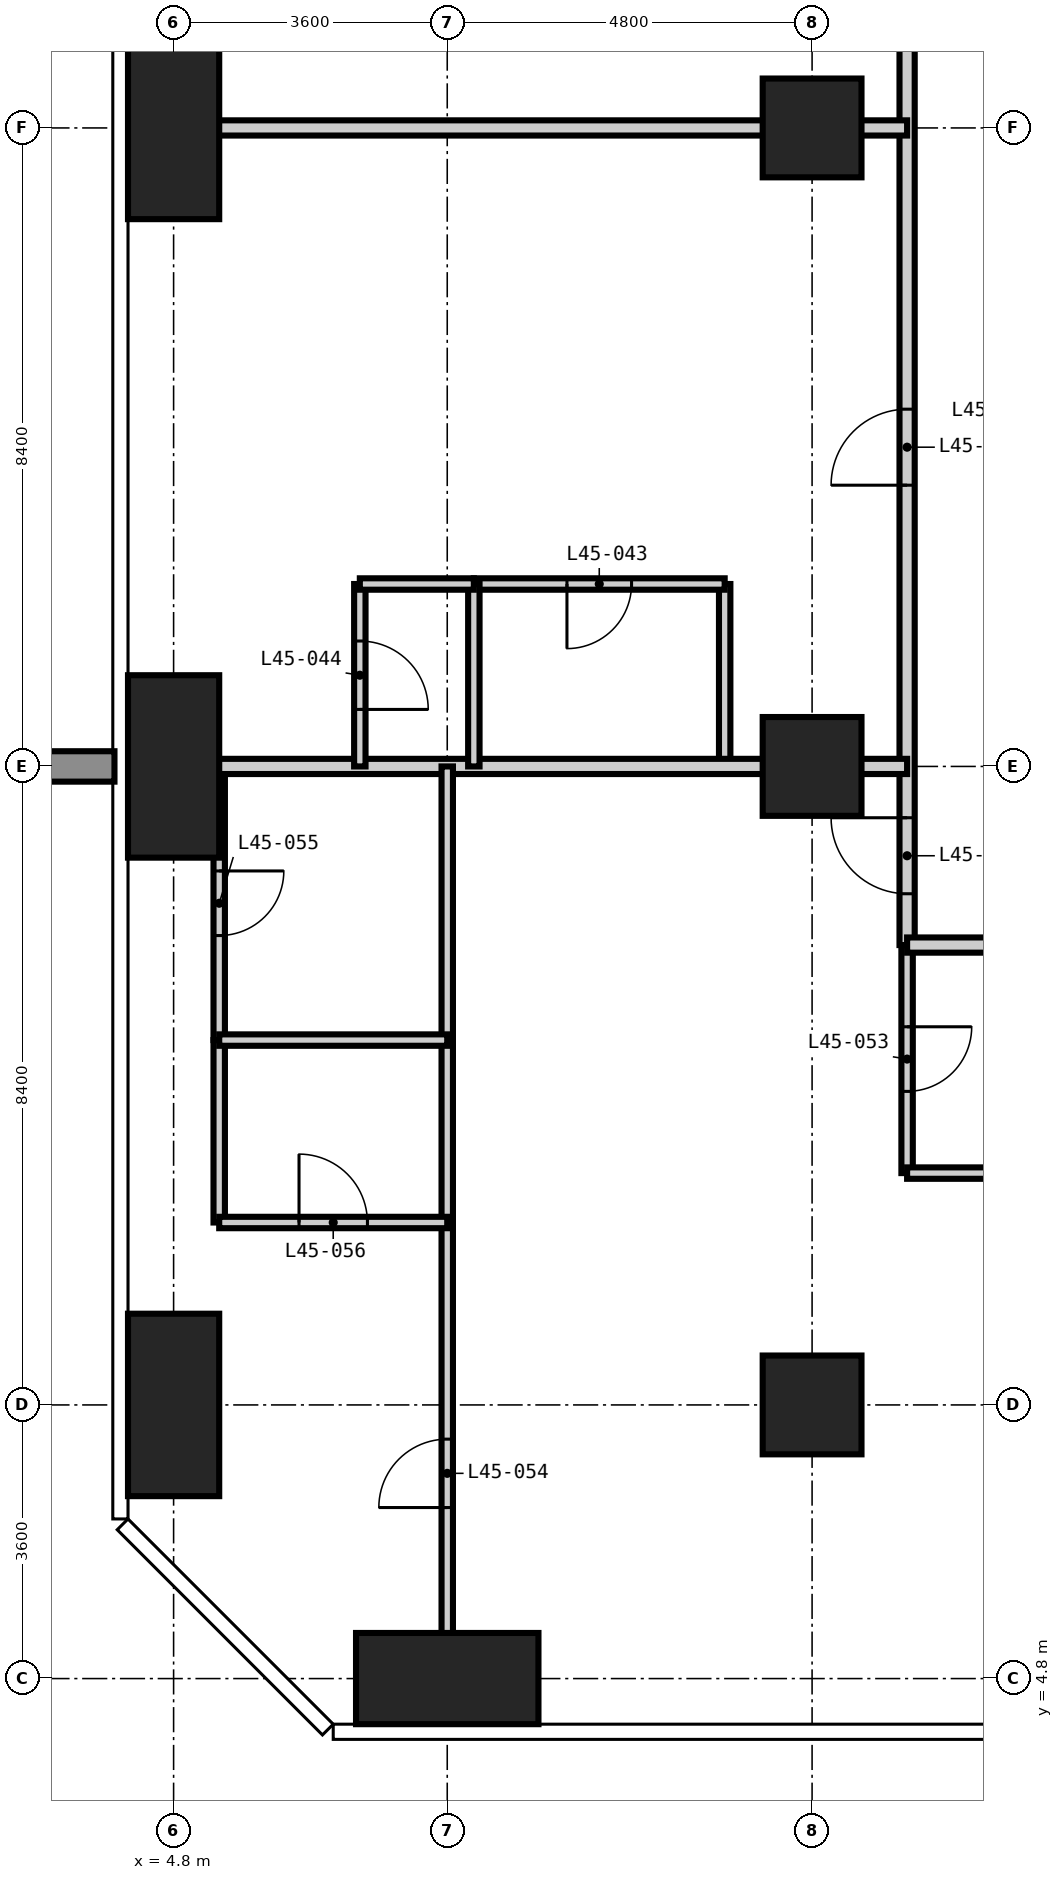
"""IFC4 building model, lengths in metres.
Left out: names, types, materials, properties, quantities, classifications, styles, units other than length and angle.
Written with IfcOpenShell. Run it as: python <this file> out.ifc"""

import sys

from ifc_helpers import new_model, si_unit, direction, frame, frame_2d, origin, origin_2d, place, context, subcontext, project, spatial, rectangle, extrude, element, fill, save


model = new_model("IFC4")
c1 = context("Model", 3, precision=1e-05, world=origin(), true_north=direction((0.0, 1.0)))
c2 = subcontext(c1, "Body", "Model", "MODEL_VIEW")
j1 = project(units=[si_unit("LENGTHUNIT", "METRE"), si_unit("PLANEANGLEUNIT", "RADIAN")], contexts=[c1])
p1 = place(None, origin())
s1 = spatial("IfcSite", under=j1, at=p1, CompositionType="ELEMENT")
p2 = place(p1, origin())
s2 = spatial("IfcBuilding", under=s1, at=p2, CompositionType="ELEMENT")
p3 = place(p2, frame((0.0, 0.0, 177.0)))
s3 = spatial("IfcBuildingStorey", under=s2, at=p3, CompositionType="ELEMENT", Elevation=177.0)
for number, where, z_axis, x_axis in (
    (1, (4.8, 8.4, -0.35), (0.0, 0.0, 1.0), (1.0, 0.0, 0.0)),
    (2, (4.8, 16.8, -0.35), (0.0, 0.0, 1.0), (1.0, 0.0, 0.0)),
    (3, (4.8, 25.2, -0.35), (0.0, 0.0, 1.0), (1.0, 0.0, 0.0)),
):
    element("IfcColumn", number, at=place(p3, frame(where, z_axis=z_axis, x_axis=x_axis)), inside=s3, PredefinedType="COLUMN", context=c2, shape_type="SweptSolid", body=[
        extrude(rectangle(XDim=1.2, YDim=2.4, at=origin_2d()), origin(), (0.0, 0.0, 1.0), 3.6),
    ])
p4 = place(p3, frame((8.4, 4.8, -0.35), z_axis=(0.0, 0.0, 1.0), x_axis=(1.0, 0.0, 0.0)))
e4 = element("IfcColumn", 4, at=p4, inside=s3, PredefinedType="COLUMN", context=c2, shape_type="SweptSolid", body=[
    extrude(rectangle(XDim=2.4, YDim=1.2, at=origin_2d()), origin(), (0.0, 0.0, 1.0), 3.6),
])
for number, where, z_axis, x_axis in (
    (5, (13.2, 8.4, -0.35), (0.0, 0.0, 1.0), (1.0, 0.0, 0.0)),
    (6, (13.2, 16.8, -0.35), (0.0, 0.0, 1.0), (1.0, 0.0, 0.0)),
    (7, (13.2, 25.2, -0.35), (0.0, 0.0, 1.0), (1.0, 0.0, 0.0)),
):
    element("IfcColumn", number, at=place(p3, frame(where, z_axis=z_axis, x_axis=x_axis)), inside=s3, PredefinedType="COLUMN", context=c2, shape_type="SweptSolid", body=[
        extrude(rectangle(XDim=1.3, YDim=1.3, at=origin_2d()), origin(), (0.0, 0.0, 1.0), 3.6),
    ])
p5 = place(p3, frame((5.4, 13.2, 0.0), z_axis=(0.0, 0.0, 1.0), x_axis=(0.0, 1.0, 0.0)))
e8 = element("IfcWall", 8, at=p5, inside=s3, PredefinedType="PARTITIONING", context=c2, shape_type="SweptSolid", body=[
    extrude(rectangle(XDim=3.6, YDim=0.15, at=frame_2d((1.8, 0.0))), origin(), (0.0, 0.0, 1.0), 3.25),
])
p6 = place(p5, frame((1.375, 0.0, 0.0)))
e9 = element("IfcOpeningElement", 9, at=p6, cuts=e8, PredefinedType="OPENING", context=c2, shape_type="SweptSolid", body=[
    extrude(rectangle(XDim=0.85, YDim=2.1, at=frame_2d((0.425, 1.05))), frame((0.0, 0.085, 0.0), z_axis=(0.0, -1.0, 0.0), x_axis=(1.0, 0.0, 0.0)), (0.0, 0.0, 1.0), 0.17),
])
p7 = place(p3, frame((12.05, 16.8, 0.0), z_axis=(0.0, 0.0, 1.0), x_axis=(0.0, 1.0, 0.0)))
e10 = element("IfcWall", 10, at=p7, inside=s3, PredefinedType="PARTITIONING", context=c2, shape_type="SweptSolid", body=[
    extrude(rectangle(XDim=2.4, YDim=0.15, at=frame_2d((1.2, 0.0))), origin(), (0.0, 0.0, 1.0), 3.25),
])
p8 = place(p3, frame((14.45, 11.45, 0.0), z_axis=(0.0, 0.0, 1.0), x_axis=(0.0, 1.0, 0.0)))
e11 = element("IfcWall", 11, at=p8, inside=s3, PredefinedType="PARTITIONING", context=c2, shape_type="SweptSolid", body=[
    extrude(rectangle(XDim=3.0, YDim=0.15, at=frame_2d((1.5, 0.0))), origin(), (0.0, 0.0, 1.0), 3.25),
])
p9 = place(p8, frame((1.075, 0.0, 0.0)))
e12 = element("IfcOpeningElement", 12, at=p9, cuts=e11, PredefinedType="OPENING", context=c2, shape_type="SweptSolid", body=[
    extrude(rectangle(XDim=0.85, YDim=2.1, at=frame_2d((0.425, 1.05))), frame((0.0, 0.085, 0.0), z_axis=(0.0, -1.0, 0.0), x_axis=(1.0, 0.0, 0.0)), (0.0, 0.0, 1.0), 0.17),
])
p10 = place(p3, frame((14.45, 11.45, 0.0), z_axis=(0.0, 0.0, 1.0), x_axis=(1.0, 0.0, 0.0)))
e13 = element("IfcWall", 13, at=p10, inside=s3, PredefinedType="PARTITIONING", context=c2, shape_type="SweptSolid", body=[
    extrude(rectangle(XDim=2.35, YDim=0.15, at=frame_2d((1.175, 0.0))), origin(), (0.0, 0.0, 1.0), 3.25),
])
p11 = place(p3, frame((8.75, 19.2, 0.0), z_axis=(0.0, 0.0, 1.0), x_axis=(1.0, 0.0, 0.0)))
e14 = element("IfcWall", 14, at=p11, inside=s3, PredefinedType="PARTITIONING", context=c2, shape_type="SweptSolid", body=[
    extrude(rectangle(XDim=3.3, YDim=0.15, at=frame_2d((1.65, 0.0))), origin(), (0.0, 0.0, 1.0), 3.25),
])
p12 = place(p11, frame((1.225, 0.0, 0.0)))
e15 = element("IfcOpeningElement", 15, at=p12, cuts=e14, PredefinedType="OPENING", context=c2, shape_type="SweptSolid", body=[
    extrude(rectangle(XDim=0.85, YDim=2.1, at=frame_2d((0.425, 1.05))), frame((0.0, 0.085, 0.0), z_axis=(0.0, -1.0, 0.0), x_axis=(1.0, 0.0, 0.0)), (0.0, 0.0, 1.0), 0.17),
])
p13 = place(p3, frame((14.45, 14.45, 0.0), z_axis=(0.0, 0.0, 1.0), x_axis=(0.0, 1.0, 0.0)))
e16 = element("IfcWall", 16, at=p13, inside=s3, PredefinedType="PARTITIONING", context=c2, shape_type="SweptSolid", body=[
    extrude(rectangle(XDim=31.1, YDim=0.2, at=frame_2d((15.55, 0.0))), origin(), (0.0, 0.0, 1.0), 3.25),
])
p14 = place(p13, frame((6.05, 0.0, 0.0)))
e17 = element("IfcOpeningElement", 17, at=p14, cuts=e16, PredefinedType="OPENING", context=c2, shape_type="SweptSolid", body=[
    extrude(rectangle(XDim=1.0, YDim=2.2, at=frame_2d((0.5, 1.1))), frame((0.0, 0.11, 0.0), z_axis=(0.0, -1.0, 0.0), x_axis=(1.0, 0.0, 0.0)), (0.0, 0.0, 1.0), 0.22),
])
p15 = place(p13, frame((11.95, 0.0, 0.0)))
e18 = element("IfcOpeningElement", 18, at=p15, cuts=e16, PredefinedType="OPENING", context=c2, shape_type="SweptSolid", body=[
    extrude(rectangle(XDim=1.8, YDim=2.4, at=frame_2d((0.9, 1.2))), frame((0.0, 0.11, 0.0), z_axis=(0.0, -1.0, 0.0), x_axis=(1.0, 0.0, 0.0)), (0.0, 0.0, 1.0), 0.22),
])
p16 = place(p13, frame((19.575, 0.0, 0.0)))
e19 = element("IfcOpeningElement", 19, at=p16, cuts=e16, PredefinedType="OPENING", context=c2, shape_type="SweptSolid", body=[
    extrude(rectangle(XDim=1.0, YDim=2.2, at=frame_2d((0.5, 1.1))), frame((0.0, 0.11, 0.0), z_axis=(0.0, -1.0, 0.0), x_axis=(1.0, 0.0, 0.0)), (0.0, 0.0, 1.0), 0.22),
])
p17 = place(p13, frame((24.95, 0.0, 0.0)))
e20 = element("IfcOpeningElement", 20, at=p17, cuts=e16, PredefinedType="OPENING", context=c2, shape_type="SweptSolid", body=[
    extrude(rectangle(XDim=1.0, YDim=2.2, at=frame_2d((0.5, 1.1))), frame((0.0, 0.11, 0.0), z_axis=(0.0, -1.0, 0.0), x_axis=(1.0, 0.0, 0.0)), (0.0, 0.0, 1.0), 0.22),
])
p18 = place(p13, frame((0.675, 0.0, 0.0)))
e21 = element("IfcOpeningElement", 21, at=p18, cuts=e16, PredefinedType="OPENING", context=c2, shape_type="SweptSolid", body=[
    extrude(rectangle(XDim=1.0, YDim=2.2, at=frame_2d((0.5, 1.1))), frame((0.0, 0.11, 0.0), z_axis=(0.0, -1.0, 0.0), x_axis=(1.0, 0.0, 0.0)), (0.0, 0.0, 1.0), 0.22),
])
p19 = place(p13, frame((28.825, 0.0, 0.0)))
e22 = element("IfcOpeningElement", 22, at=p19, cuts=e16, PredefinedType="OPENING", context=c2, shape_type="SweptSolid", body=[
    extrude(rectangle(XDim=1.0, YDim=2.2, at=frame_2d((0.5, 1.1))), frame((0.0, 0.11, 0.0), z_axis=(0.0, -1.0, 0.0), x_axis=(1.0, 0.0, 0.0)), (0.0, 0.0, 1.0), 0.22),
])
p20 = place(p3, frame((44.95, 14.45, 0.0), z_axis=(0.0, 0.0, 1.0), x_axis=(-1.0, 0.0, 0.0)))
e23 = element("IfcWall", 23, at=p20, inside=s3, PredefinedType="PARTITIONING", context=c2, shape_type="SweptSolid", body=[
    extrude(rectangle(XDim=30.5, YDim=0.2, at=frame_2d((15.25, 0.0))), origin(), (0.0, 0.0, 1.0), 3.25),
])
p21 = place(p20, frame((24.65, 0.0, 0.0)))
e24 = element("IfcOpeningElement", 24, at=p21, cuts=e23, PredefinedType="OPENING", context=c2, shape_type="SweptSolid", body=[
    extrude(rectangle(XDim=1.0, YDim=2.2, at=frame_2d((0.5, 1.1))), frame((0.0, 0.11, 0.0), z_axis=(0.0, -1.0, 0.0), x_axis=(1.0, 0.0, 0.0)), (0.0, 0.0, 1.0), 0.22),
])
p22 = place(p20, frame((13.85, 0.0, 0.0)))
e25 = element("IfcOpeningElement", 25, at=p22, cuts=e23, PredefinedType="OPENING", context=c2, shape_type="SweptSolid", body=[
    extrude(rectangle(XDim=1.0, YDim=2.2, at=frame_2d((0.5, 1.1))), frame((0.0, 0.11, 0.0), z_axis=(0.0, -1.0, 0.0), x_axis=(1.0, 0.0, 0.0)), (0.0, 0.0, 1.0), 0.22),
])
p23 = place(p20, frame((7.85, 0.0, 0.0)))
e26 = element("IfcOpeningElement", 26, at=p23, cuts=e23, PredefinedType="OPENING", context=c2, shape_type="SweptSolid", body=[
    extrude(rectangle(XDim=1.0, YDim=2.2, at=frame_2d((0.5, 1.1))), frame((0.0, 0.11, 0.0), z_axis=(0.0, -1.0, 0.0), x_axis=(1.0, 0.0, 0.0)), (0.0, 0.0, 1.0), 0.22),
])
for number, where, z_axis, x_axis in (
    (27, (4.182, 16.8, 0.0), (0.0, 0.0, 1.0), (1.0, 0.0, 0.0)),
    (28, (4.182, 25.2, 0.0), (0.0, 0.0, 1.0), (1.0, 0.0, 0.0)),
):
    element("IfcWall", number, at=place(p3, frame(where, z_axis=z_axis, x_axis=x_axis)), inside=s3, PredefinedType="PARTITIONING", context=c2, shape_type="SweptSolid", body=[
        extrude(rectangle(XDim=10.268, YDim=0.2, at=frame_2d((5.134, 0.0))), origin(), (0.0, 0.0, 1.0), 3.25),
    ])
p24 = place(p3, frame((5.4, 10.8, 0.0), z_axis=(0.0, 0.0, 1.0), x_axis=(0.0, 1.0, 0.0)))
e29 = element("IfcWall", 29, at=p24, inside=s3, PredefinedType="PARTITIONING", context=c2, shape_type="SweptSolid", body=[
    extrude(rectangle(XDim=2.4, YDim=0.15, at=frame_2d((1.2, 0.0))), origin(), (0.0, 0.0, 1.0), 3.25),
])
p25 = place(p3, frame((7.25, 16.8, 0.0), z_axis=(0.0, 0.0, 1.0), x_axis=(0.0, 1.0, 0.0)))
e30 = element("IfcWall", 30, at=p25, inside=s3, PredefinedType="PARTITIONING", context=c2, shape_type="SweptSolid", body=[
    extrude(rectangle(XDim=2.4, YDim=0.15, at=frame_2d((1.2, 0.0))), origin(), (0.0, 0.0, 1.0), 3.25),
])
p26 = place(p25, frame((0.75, 0.0, 0.0)))
e31 = element("IfcOpeningElement", 31, at=p26, cuts=e30, PredefinedType="OPENING", context=c2, shape_type="SweptSolid", body=[
    extrude(rectangle(XDim=0.9, YDim=2.1, at=frame_2d((0.45, 1.05))), frame((0.0, 0.085, 0.0), z_axis=(0.0, -1.0, 0.0), x_axis=(1.0, 0.0, 0.0)), (0.0, 0.0, 1.0), 0.17),
])
p27 = place(p3, frame((8.4, 4.182, 0.0), z_axis=(0.0, 0.0, 1.0), x_axis=(0.0, 1.0, 0.0)))
e32 = element("IfcWall", 32, at=p27, inside=s3, PredefinedType="PARTITIONING", context=c2, shape_type="SweptSolid", body=[
    extrude(rectangle(XDim=12.618, YDim=0.15, at=frame_2d((6.309, 0.0))), origin(), (0.0, 0.0, 1.0), 3.25),
])
p28 = place(p27, frame((2.868, 0.0, 0.0)))
e33 = element("IfcOpeningElement", 33, at=p28, cuts=e32, PredefinedType="OPENING", context=c2, shape_type="SweptSolid", body=[
    extrude(rectangle(XDim=0.9, YDim=2.1, at=frame_2d((0.45, 1.05))), frame((0.0, 0.085, 0.0), z_axis=(0.0, -1.0, 0.0), x_axis=(1.0, 0.0, 0.0)), (0.0, 0.0, 1.0), 0.17),
])
p29 = place(p3, frame((8.75, 16.8, 0.0), z_axis=(0.0, 0.0, 1.0), x_axis=(0.0, 1.0, 0.0)))
e34 = element("IfcWall", 34, at=p29, inside=s3, PredefinedType="PARTITIONING", context=c2, shape_type="SweptSolid", body=[
    extrude(rectangle(XDim=2.4, YDim=0.15, at=frame_2d((1.2, 0.0))), origin(), (0.0, 0.0, 1.0), 3.25),
])
p30 = place(p3, frame((5.4, 10.8, 0.0), z_axis=(0.0, 0.0, 1.0), x_axis=(1.0, 0.0, 0.0)))
e35 = element("IfcWall", 35, at=p30, inside=s3, PredefinedType="PARTITIONING", context=c2, shape_type="SweptSolid", body=[
    extrude(rectangle(XDim=3.0, YDim=0.15, at=frame_2d((1.5, 0.0))), origin(), (0.0, 0.0, 1.0), 3.25),
])
p31 = place(p30, frame((1.05, 0.0, 0.0)))
e36 = element("IfcOpeningElement", 36, at=p31, cuts=e35, PredefinedType="OPENING", context=c2, shape_type="SweptSolid", body=[
    extrude(rectangle(XDim=0.9, YDim=2.1, at=frame_2d((0.45, 1.05))), frame((0.0, 0.085, 0.0), z_axis=(0.0, -1.0, 0.0), x_axis=(1.0, 0.0, 0.0)), (0.0, 0.0, 1.0), 0.17),
])
p32 = place(p3, frame((5.4, 13.2, 0.0), z_axis=(0.0, 0.0, 1.0), x_axis=(1.0, 0.0, 0.0)))
e37 = element("IfcWall", 37, at=p32, inside=s3, PredefinedType="PARTITIONING", context=c2, shape_type="SweptSolid", body=[
    extrude(rectangle(XDim=3.0, YDim=0.15, at=frame_2d((1.5, 0.0))), origin(), (0.0, 0.0, 1.0), 3.25),
])
p33 = place(p3, frame((7.25, 19.2, 0.0), z_axis=(0.0, 0.0, 1.0), x_axis=(1.0, 0.0, 0.0)))
e38 = element("IfcWall", 38, at=p33, inside=s3, PredefinedType="PARTITIONING", context=c2, shape_type="SweptSolid", body=[
    extrude(rectangle(XDim=1.5, YDim=0.15, at=frame_2d((0.75, 0.0))), origin(), (0.0, 0.0, 1.0), 3.25),
])
p34 = place(p14, origin())
e39 = element("IfcDoor", 39, at=p34, inside=s3, OperationType="SINGLE_SWING_LEFT", PredefinedType="DOOR", context=c2, shape_type="SweptSolid", body=[
    extrude(rectangle(XDim=1.0, YDim=2.2, at=frame_2d((0.5, 1.1))), frame((0.0, 0.025, 0.0), z_axis=(0.0, -1.0, 0.0), x_axis=(1.0, 0.0, 0.0)), (0.0, 0.0, 1.0), 0.05),
])
fill(e17, e39)
p35 = place(p12, frame((0.85, 0.0, 0.0), z_axis=(0.0, 0.0, 1.0), x_axis=(-1.0, 0.0, 0.0)))
e40 = element("IfcDoor", 40, at=p35, inside=s3, OperationType="SINGLE_SWING_RIGHT", PredefinedType="DOOR", context=c2, shape_type="SweptSolid", body=[
    extrude(rectangle(XDim=0.85, YDim=2.1, at=frame_2d((0.425, 1.05))), frame((0.0, 0.025, 0.0), z_axis=(0.0, -1.0, 0.0), x_axis=(1.0, 0.0, 0.0)), (0.0, 0.0, 1.0), 0.05),
])
fill(e15, e40)
p36 = place(p26, frame((0.9, 0.0, 0.0), z_axis=(0.0, 0.0, 1.0), x_axis=(-1.0, 0.0, 0.0)))
e41 = element("IfcDoor", 41, at=p36, inside=s3, OperationType="SINGLE_SWING_RIGHT", PredefinedType="DOOR", context=c2, shape_type="SweptSolid", body=[
    extrude(rectangle(XDim=0.9, YDim=2.1, at=frame_2d((0.45, 1.05))), frame((0.0, 0.025, 0.0), z_axis=(0.0, -1.0, 0.0), x_axis=(1.0, 0.0, 0.0)), (0.0, 0.0, 1.0), 0.05),
])
fill(e31, e41)
p37 = place(p18, origin())
e42 = element("IfcDoor", 42, at=p37, inside=s3, OperationType="SINGLE_SWING_RIGHT", PredefinedType="DOOR", context=c2, shape_type="SweptSolid", body=[
    extrude(rectangle(XDim=1.0, YDim=2.2, at=frame_2d((0.5, 1.1))), frame((0.0, 0.025, 0.0), z_axis=(0.0, -1.0, 0.0), x_axis=(1.0, 0.0, 0.0)), (0.0, 0.0, 1.0), 0.05),
])
fill(e21, e42)
p38 = place(p9, frame((0.85, 0.0, 0.0), z_axis=(0.0, 0.0, 1.0), x_axis=(-1.0, 0.0, 0.0)))
e43 = element("IfcDoor", 43, at=p38, inside=s3, OperationType="SINGLE_SWING_LEFT", PredefinedType="DOOR", context=c2, shape_type="SweptSolid", body=[
    extrude(rectangle(XDim=0.85, YDim=2.1, at=frame_2d((0.425, 1.05))), frame((0.0, 0.025, 0.0), z_axis=(0.0, -1.0, 0.0), x_axis=(1.0, 0.0, 0.0)), (0.0, 0.0, 1.0), 0.05),
])
fill(e12, e43)
p39 = place(p28, origin())
e44 = element("IfcDoor", 44, at=p39, inside=s3, OperationType="SINGLE_SWING_LEFT", PredefinedType="DOOR", context=c2, shape_type="SweptSolid", body=[
    extrude(rectangle(XDim=0.9, YDim=2.1, at=frame_2d((0.45, 1.05))), frame((0.0, 0.025, 0.0), z_axis=(0.0, -1.0, 0.0), x_axis=(1.0, 0.0, 0.0)), (0.0, 0.0, 1.0), 0.05),
])
fill(e33, e44)
p40 = place(p6, frame((0.85, 0.0, 0.0), z_axis=(0.0, 0.0, 1.0), x_axis=(-1.0, 0.0, 0.0)))
e45 = element("IfcDoor", 45, at=p40, inside=s3, OperationType="SINGLE_SWING_LEFT", PredefinedType="DOOR", context=c2, shape_type="SweptSolid", body=[
    extrude(rectangle(XDim=0.85, YDim=2.1, at=frame_2d((0.425, 1.05))), frame((0.0, 0.025, 0.0), z_axis=(0.0, -1.0, 0.0), x_axis=(1.0, 0.0, 0.0)), (0.0, 0.0, 1.0), 0.05),
])
fill(e9, e45)
p41 = place(p31, origin())
e46 = element("IfcDoor", 46, at=p41, inside=s3, OperationType="SINGLE_SWING_LEFT", PredefinedType="DOOR", context=c2, shape_type="SweptSolid", body=[
    extrude(rectangle(XDim=0.9, YDim=2.1, at=frame_2d((0.45, 1.05))), frame((0.0, 0.025, 0.0), z_axis=(0.0, -1.0, 0.0), x_axis=(1.0, 0.0, 0.0)), (0.0, 0.0, 1.0), 0.05),
])
fill(e36, e46)
save(model, sys.argv[1])
